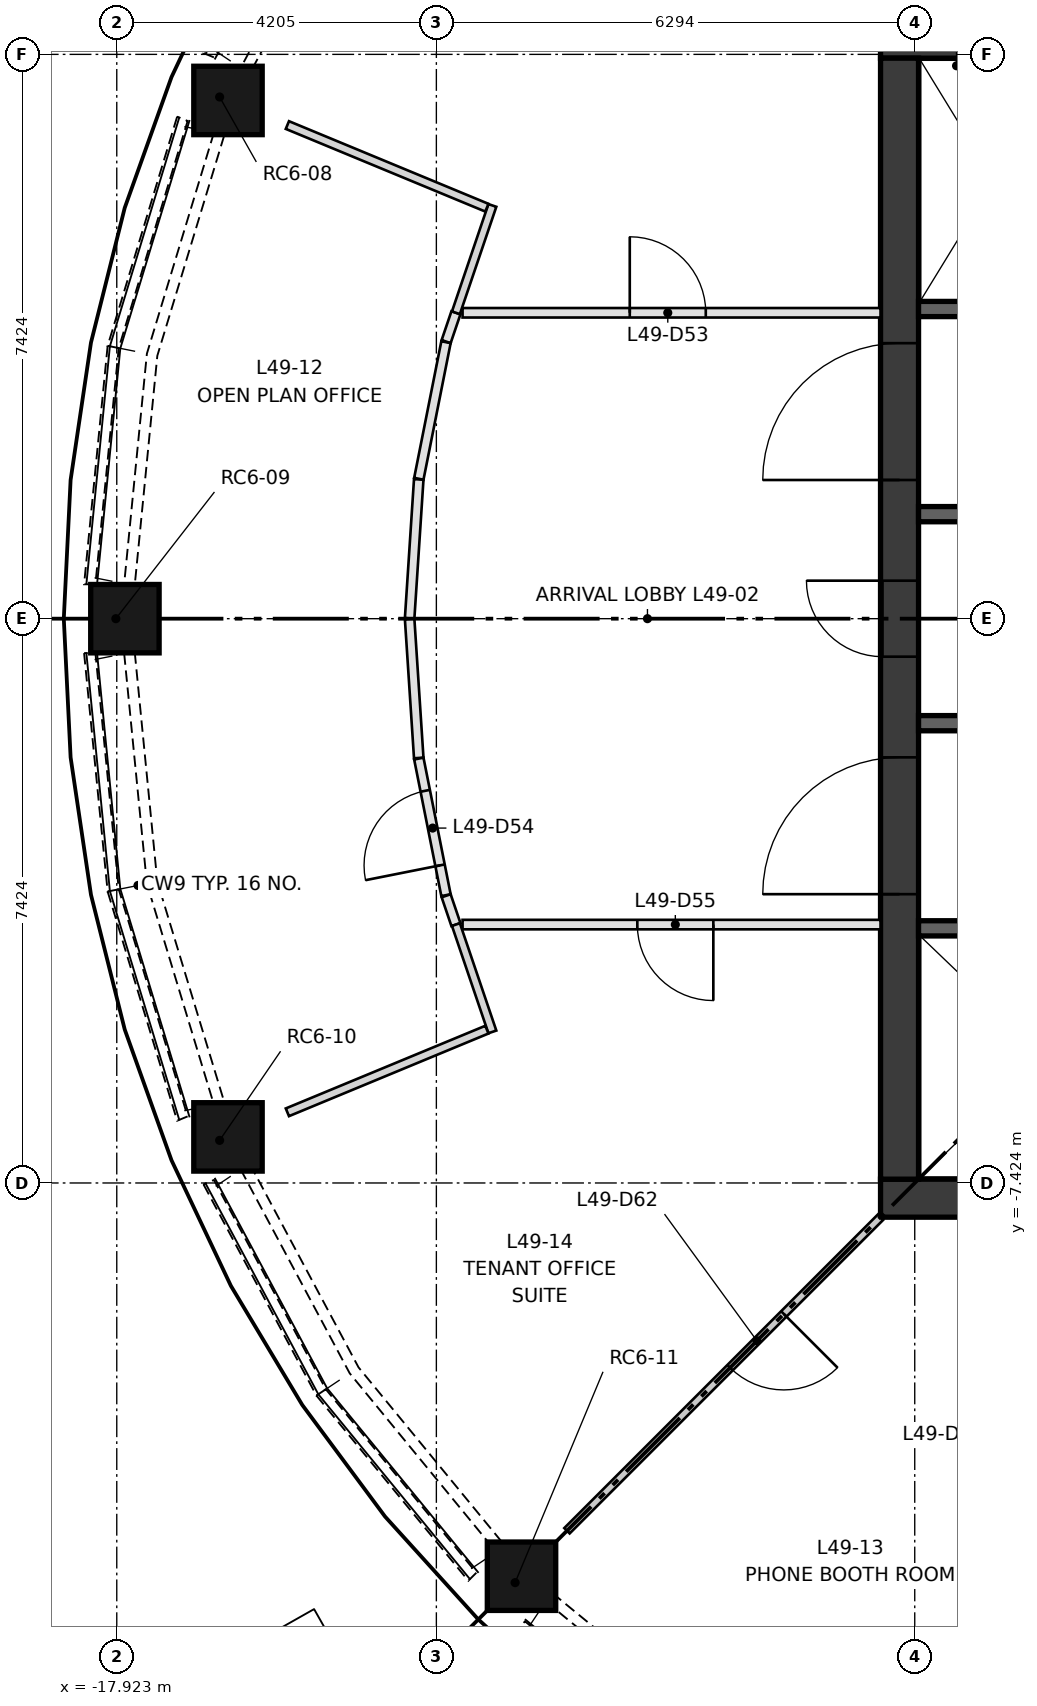
"""IFC4 building model, lengths in metres.
Left out: names, types, materials, properties, quantities, classifications, styles, units other than length and angle.
Written with IfcOpenShell. Run it as: python <this file> out.ifc"""

import sys

from ifc_helpers import new_model, si_unit, direction, frame, frame_2d, origin, origin_2d, place, context, subcontext, project, spatial, polyline, rectangle, outline, extrude, element, fill, save


model = new_model("IFC4")
c1 = context("Model", 3, precision=1e-05, world=origin(), true_north=direction((0.0, 1.0)))
c2 = subcontext(c1, "Body", "Model", "MODEL_VIEW")
j1 = project(units=[si_unit("LENGTHUNIT", "METRE"), si_unit("PLANEANGLEUNIT", "RADIAN")], contexts=[c1])
p1 = place(None, origin())
s1 = spatial("IfcSite", under=j1, at=p1, CompositionType="ELEMENT")
p2 = place(p1, origin())
s2 = spatial("IfcBuilding", under=s1, at=p2, CompositionType="ELEMENT")
p3 = place(p2, frame((0.0, 0.0, 184.3)))
s3 = spatial("IfcBuildingStorey", under=s2, at=p3, CompositionType="ELEMENT", Elevation=184.3)
p4 = place(p3, frame((-16.57, 6.863, 0.5), z_axis=(0.0, 0.0, 1.0), x_axis=(0.382100188932, 0.924120904221, 0.0)))
e1 = element("IfcColumn", 1, at=p4, inside=s3, PredefinedType="COLUMN", context=c2, shape_type="SweptSolid", body=[
    extrude(rectangle(XDim=0.9, YDim=0.9, at=origin_2d()), origin(), (0.0, -0.168, 0.986), 2.384),
])
p5 = place(p3, frame((-17.935, 0.0, 0.5), z_axis=(0.0, 0.0, 1.0), x_axis=(0.0, 1.0, 0.0)))
e2 = element("IfcColumn", 2, at=p5, inside=s3, PredefinedType="COLUMN", context=c2, shape_type="SweptSolid", body=[
    extrude(rectangle(XDim=0.9, YDim=0.9, at=origin_2d()), origin(), (0.0, -0.168, 0.986), 2.384),
])
p6 = place(p3, frame((-16.57, -6.863, 0.5), z_axis=(0.0, 0.0, 1.0), x_axis=(-0.382100188932, 0.924120904221, 0.0)))
e3 = element("IfcColumn", 3, at=p6, inside=s3, PredefinedType="COLUMN", context=c2, shape_type="SweptSolid", body=[
    extrude(rectangle(XDim=0.9, YDim=0.9, at=origin_2d()), origin(), (0.0, -0.168, 0.986), 2.384),
])
p7 = place(p3, frame((-12.682, -12.682, 0.5), z_axis=(0.0, 0.0, 1.0), x_axis=(-0.707106781187, 0.707106781187, 0.0)))
e4 = element("IfcColumn", 4, at=p7, inside=s3, PredefinedType="COLUMN", context=c2, shape_type="SweptSolid", body=[
    extrude(rectangle(XDim=0.9, YDim=0.9, at=origin_2d()), origin(), (0.0, -0.168, 0.986), 2.384),
])
for number, where, z_axis, x_axis in (
    (5, (-7.874, -7.624, 0.0), (0.0, 0.0, 1.0), (1.0, 0.0, 0.0)),
    (6, (-7.874, 7.624, 0.0), (0.0, 0.0, 1.0), (1.0, 0.0, 0.0)),
):
    element("IfcWall", number, at=place(p3, frame(where, z_axis=z_axis, x_axis=x_axis)), inside=s3, PredefinedType="SHEAR", context=c2, shape_type="SweptSolid", body=[
        extrude(rectangle(XDim=15.748, YDim=0.5, at=frame_2d((7.874, 0.0))), origin(), (0.0, 0.0, 1.0), 3.35),
    ])
p8 = place(p3, frame((-7.624, -7.374, 0.0), z_axis=(0.0, 0.0, 1.0), x_axis=(0.0, 1.0, 0.0)))
e7 = element("IfcWall", 7, at=p8, inside=s3, PredefinedType="SHEAR", context=c2, shape_type="SweptSolid", body=[
    extrude(rectangle(XDim=14.748, YDim=0.5, at=frame_2d((7.374, 0.0))), origin(), (0.0, 0.0, 1.0), 3.35),
])
p9 = place(p8, frame((6.874, 0.0, 0.0)))
e8 = element("IfcOpeningElement", 8, at=p9, cuts=e7, PredefinedType="OPENING", context=c2, shape_type="SweptSolid", body=[
    extrude(rectangle(XDim=1.0, YDim=2.1, at=frame_2d((0.5, 1.05))), frame((0.0, 0.26, 0.0), z_axis=(0.0, -1.0, 0.0), x_axis=(1.0, 0.0, 0.0)), (0.0, 0.0, 1.0), 0.52),
])
p10 = place(p8, frame((3.75, 0.0, 0.0)))
e9 = element("IfcOpeningElement", 9, at=p10, cuts=e7, PredefinedType="OPENING", context=c2, shape_type="SweptSolid", body=[
    extrude(rectangle(XDim=1.8, YDim=2.1, at=frame_2d((0.9, 1.05))), frame((0.0, 0.26, 0.0), z_axis=(0.0, -1.0, 0.0), x_axis=(1.0, 0.0, 0.0)), (0.0, 0.0, 1.0), 0.52),
])
p11 = place(p8, frame((9.198, 0.0, 0.0)))
e10 = element("IfcOpeningElement", 10, at=p11, cuts=e7, PredefinedType="OPENING", context=c2, shape_type="SweptSolid", body=[
    extrude(rectangle(XDim=1.8, YDim=2.1, at=frame_2d((0.9, 1.05))), frame((0.0, 0.26, 0.0), z_axis=(0.0, -1.0, 0.0), x_axis=(1.0, 0.0, 0.0)), (0.0, 0.0, 1.0), 0.52),
])
p12 = place(p3, frame((-7.374, -4.074, 0.0), z_axis=(0.0, 0.0, 1.0), x_axis=(1.0, 0.0, 0.0)))
e11 = element("IfcWall", 11, at=p12, inside=s3, PredefinedType="SHEAR", context=c2, shape_type="SweptSolid", body=[
    extrude(rectangle(XDim=14.748, YDim=0.2, at=frame_2d((7.374, 0.0))), origin(), (0.0, 0.0, 1.0), 3.0),
])
p13 = place(p12, frame((1.319, 0.0, 0.0)))
e12 = element("IfcOpeningElement", 12, at=p13, cuts=e11, PredefinedType="OPENING", context=c2, shape_type="SweptSolid", body=[
    extrude(rectangle(XDim=1.1, YDim=2.1, at=frame_2d((0.55, 1.05))), frame((0.0, 0.11, 0.0), z_axis=(0.0, -1.0, 0.0), x_axis=(1.0, 0.0, 0.0)), (0.0, 0.0, 1.0), 0.22),
])
p14 = place(p12, frame((4.456, 0.0, 0.0)))
e13 = element("IfcOpeningElement", 13, at=p14, cuts=e11, PredefinedType="OPENING", context=c2, shape_type="SweptSolid", body=[
    extrude(rectangle(XDim=1.1, YDim=2.1, at=frame_2d((0.55, 1.05))), frame((0.0, 0.11, 0.0), z_axis=(0.0, -1.0, 0.0), x_axis=(1.0, 0.0, 0.0)), (0.0, 0.0, 1.0), 0.22),
])
p15 = place(p12, frame((7.386, 0.0, 0.0)))
e14 = element("IfcOpeningElement", 14, at=p15, cuts=e11, PredefinedType="OPENING", context=c2, shape_type="SweptSolid", body=[
    extrude(rectangle(XDim=1.0, YDim=2.1, at=frame_2d((0.5, 1.05))), frame((0.0, 0.11, 0.0), z_axis=(0.0, -1.0, 0.0), x_axis=(1.0, 0.0, 0.0)), (0.0, 0.0, 1.0), 0.22),
])
p16 = place(p12, frame((10.009, 0.0, 0.0)))
e15 = element("IfcOpeningElement", 15, at=p16, cuts=e11, PredefinedType="OPENING", context=c2, shape_type="SweptSolid", body=[
    extrude(rectangle(XDim=1.0, YDim=2.1, at=frame_2d((0.5, 1.05))), frame((0.0, 0.11, 0.0), z_axis=(0.0, -1.0, 0.0), x_axis=(1.0, 0.0, 0.0)), (0.0, 0.0, 1.0), 0.22),
])
p17 = place(p12, frame((12.934, 0.0, 0.0)))
e16 = element("IfcOpeningElement", 16, at=p17, cuts=e11, PredefinedType="OPENING", context=c2, shape_type="SweptSolid", body=[
    extrude(rectangle(XDim=0.8, YDim=2.1, at=frame_2d((0.4, 1.05))), frame((0.0, 0.11, 0.0), z_axis=(0.0, -1.0, 0.0), x_axis=(1.0, 0.0, 0.0)), (0.0, 0.0, 1.0), 0.22),
])
p18 = place(p3, frame((-7.374, 4.074, 0.0), z_axis=(0.0, 0.0, 1.0), x_axis=(1.0, 0.0, 0.0)))
e17 = element("IfcWall", 17, at=p18, inside=s3, PredefinedType="SHEAR", context=c2, shape_type="SweptSolid", body=[
    extrude(rectangle(XDim=7.374, YDim=0.2, at=frame_2d((3.687, 0.0))), origin(), (0.0, 0.0, 1.0), 3.0),
])
p19 = place(p18, frame((0.684, 0.0, 0.0)))
e18 = element("IfcOpeningElement", 18, at=p19, cuts=e17, PredefinedType="OPENING", context=c2, shape_type="SweptSolid", body=[
    extrude(rectangle(XDim=1.0, YDim=2.1, at=frame_2d((0.5, 1.05))), frame((0.0, 0.11, 0.0), z_axis=(0.0, -1.0, 0.0), x_axis=(1.0, 0.0, 0.0)), (0.0, 0.0, 1.0), 0.22),
])
p20 = place(p18, frame((2.453, 0.0, 0.0)))
e19 = element("IfcOpeningElement", 19, at=p20, cuts=e17, PredefinedType="OPENING", context=c2, shape_type="SweptSolid", body=[
    extrude(rectangle(XDim=1.0, YDim=2.1, at=frame_2d((0.5, 1.05))), frame((0.0, 0.11, 0.0), z_axis=(0.0, -1.0, 0.0), x_axis=(1.0, 0.0, 0.0)), (0.0, 0.0, 1.0), 0.22),
])
p21 = place(p18, frame((4.221, 0.0, 0.0)))
e20 = element("IfcOpeningElement", 20, at=p21, cuts=e17, PredefinedType="OPENING", context=c2, shape_type="SweptSolid", body=[
    extrude(rectangle(XDim=1.0, YDim=2.1, at=frame_2d((0.5, 1.05))), frame((0.0, 0.11, 0.0), z_axis=(0.0, -1.0, 0.0), x_axis=(1.0, 0.0, 0.0)), (0.0, 0.0, 1.0), 0.22),
])
p22 = place(p18, frame((5.99, 0.0, 0.0)))
e21 = element("IfcOpeningElement", 21, at=p22, cuts=e17, PredefinedType="OPENING", context=c2, shape_type="SweptSolid", body=[
    extrude(rectangle(XDim=1.0, YDim=2.1, at=frame_2d((0.5, 1.05))), frame((0.0, 0.11, 0.0), z_axis=(0.0, -1.0, 0.0), x_axis=(1.0, 0.0, 0.0)), (0.0, 0.0, 1.0), 0.22),
])
for number, where, z_axis, x_axis in (
    (22, (-7.374, -1.375, 0.0), (0.0, 0.0, 1.0), (1.0, 0.0, 0.0)),
    (23, (-7.374, 1.375, 0.0), (0.0, 0.0, 1.0), (1.0, 0.0, 0.0)),
):
    element("IfcWall", number, at=place(p3, frame(where, z_axis=z_axis, x_axis=x_axis)), inside=s3, PredefinedType="SHEAR", context=c2, shape_type="SweptSolid", body=[
        extrude(rectangle(XDim=3.0, YDim=0.2, at=frame_2d((1.5, 0.0))), origin(), (0.0, 0.0, 1.0), 3.0),
    ])
p23 = place(p3, frame((-15.296, 10.221, 0.0), z_axis=(-0.870053087177, 0.465338838382, 0.162688017342), x_axis=(-0.471621015005, -0.881801348468, 6.731272e-06)))
e24 = element("IfcWall", 24, at=p23, inside=s3, PredefinedType="SOLIDWALL", context=c2, shape_type="SweptSolid", body=[
    extrude(outline(polyline([(0.0, 0.0), (3.152, -2.776e-17), (3.137, 0.912), (0.015, 0.912), (0.0, 0.0)])), origin(), (0.0, 0.0, -1.0), 0.3),
])
p24 = place(p3, frame((-17.128, 6.605, 0.0), z_axis=(-0.94416395345, 0.286447724297, 0.162794748846), x_axis=(-0.290320348038, -0.956929514391, 1.683956e-06)))
e25 = element("IfcWall", 25, at=p24, inside=s3, PredefinedType="SOLIDWALL", context=c2, shape_type="SweptSolid", body=[
    extrude(outline(polyline([(0.0, 0.0), (3.151, 0.0), (3.137, 0.912), (0.014, 0.912), (0.0, 0.0)])), origin(), (0.0, 0.0, -1.0), 0.3),
])
p25 = place(p3, frame((-18.043, 3.59, 0.0), z_axis=(-0.981910573414, 0.097001095349, 0.162611233681), x_axis=(-0.098308707783, -0.995155966643, 5.283619e-06)))
e26 = element("IfcWall", 26, at=p25, inside=s3, PredefinedType="SOLIDWALL", context=c2, shape_type="SweptSolid", body=[
    extrude(outline(polyline([(0.0, 0.0), (3.152, 0.0), (3.138, 0.912), (0.015, 0.912), (0.0, 0.0)])), origin(), (0.0, 0.0, -1.0), 0.3),
])
p26 = place(p3, frame((-18.353, -0.452, 0.0), z_axis=(-0.981893053275, -0.096960979381, 0.162740899619), x_axis=(0.098271198901, -0.995159671342, 9.28862e-07)))
e27 = element("IfcWall", 27, at=p26, inside=s3, PredefinedType="SOLIDWALL", context=c2, shape_type="SweptSolid", body=[
    extrude(outline(polyline([(0.0, 0.0), (3.152, 1.388e-17), (3.138, 0.912), (0.015, 0.912), (0.0, 0.0)])), origin(), (0.0, 0.0, -1.0), 0.3),
])
p27 = place(p3, frame((-18.043, -3.59, 0.0), z_axis=(-0.944194299341, -0.286418531815, 0.162670064008), x_axis=(0.290285654048, -0.956940039415, 4.29464e-06)))
e28 = element("IfcWall", 28, at=p27, inside=s3, PredefinedType="SOLIDWALL", context=c2, shape_type="SweptSolid", body=[
    extrude(outline(polyline([(0.0, 0.0), (3.151, 5.551e-17), (3.137, 0.912), (0.014, 0.912), (0.0, 0.0)])), origin(), (0.0, 0.0, -1.0), 0.3),
])
p28 = place(p3, frame((-16.782, -7.441, 0.0), z_axis=(-0.870053087177, -0.465338838382, 0.162688017342), x_axis=(0.471621015005, -0.881801348468, -6.731272e-06)))
e29 = element("IfcWall", 29, at=p28, inside=s3, PredefinedType="SOLIDWALL", context=c2, shape_type="SweptSolid", body=[
    extrude(outline(polyline([(0.0, 0.0), (3.152, 2.776e-17), (3.137, 0.912), (0.015, 0.912), (0.0, 0.0)])), origin(), (0.0, 0.0, -1.0), 0.3),
])
p29 = place(p3, frame((-15.296, -10.221, 0.0), z_axis=(-0.762829436571, -0.625791219471, 0.162716318582), x_axis=(0.634244680745, -0.773132385109, 6.479811e-06)))
e30 = element("IfcWall", 30, at=p29, inside=s3, PredefinedType="SOLIDWALL", context=c2, shape_type="SweptSolid", body=[
    extrude(outline(polyline([(0.0, 0.0), (3.151, 0.0), (3.137, 0.912), (0.014, 0.912), (0.0, 0.0)])), origin(), (0.0, 0.0, -1.0), 0.3),
])
p30 = place(p3, frame((-12.657, -13.297, 0.0), z_axis=(-0.625801401555, -0.762803450932, 0.162798959018), x_axis=(0.773117144297, -0.634263258583, -2.518315e-06)))
e31 = element("IfcWall", 31, at=p30, inside=s3, PredefinedType="SOLIDWALL", context=c2, shape_type="SweptSolid", body=[
    extrude(outline(polyline([(0.0, 0.0), (3.151, 5.551e-17), (3.137, 0.912), (0.015, 0.912), (0.0, 0.0)])), origin(), (0.0, 0.0, -1.0), 0.3),
])
p31 = place(p3, frame((-13.373, 4.024, 0.0), z_axis=(0.0, 0.0, 1.0), x_axis=(1.0, 0.0, 0.0)))
e32 = element("IfcWall", 32, at=p31, inside=s3, PredefinedType="PARTITIONING", context=c2, shape_type="SweptSolid", body=[
    extrude(rectangle(XDim=5.499, YDim=0.125, at=frame_2d((2.75, 0.0))), origin(), (0.0, 0.0, 1.0), 3.0),
])
p32 = place(p31, frame((2.2, 0.0, 0.0)))
e33 = element("IfcOpeningElement", 33, at=p32, cuts=e32, PredefinedType="OPENING", context=c2, shape_type="SweptSolid", body=[
    extrude(rectangle(XDim=1.0, YDim=2.1, at=frame_2d((0.5, 1.05))), frame((0.0, 0.073, 0.0), z_axis=(0.0, -1.0, 0.0), x_axis=(1.0, 0.0, 0.0)), (0.0, 0.0, 1.0), 0.145),
])
for number, where, z_axis, x_axis in (
    (34, (-14.07, 0.004, 0.0), (0.0, 0.0, 1.0), (0.065, 0.998, 0.0)),
    (35, (-13.95, -1.833, 0.0), (0.0, 0.0, 1.0), (-0.065, 0.998, 0.0)),
    (36, (-13.949, 1.841, 0.0), (0.0, 0.0, 1.0), (0.195, 0.981, 0.0)),
):
    element("IfcWall", number, at=place(p3, frame(where, z_axis=z_axis, x_axis=x_axis)), inside=s3, PredefinedType="PARTITIONING", context=c2, shape_type="SweptSolid", body=[
        extrude(rectangle(XDim=1.832, YDim=0.125, at=frame_2d((0.916, 0.0))), origin(), (0.0, 0.0, 1.0), 3.0),
    ])
p33 = place(p3, frame((-13.591, -3.638, 0.0), z_axis=(0.0, 0.0, 1.0), x_axis=(-0.195065465094, 0.980790224425, 0.0)))
e37 = element("IfcWall", 37, at=p33, inside=s3, PredefinedType="PARTITIONING", context=c2, shape_type="SweptSolid", body=[
    extrude(rectangle(XDim=1.832, YDim=0.125, at=frame_2d((0.916, 0.0))), origin(), (0.0, 0.0, 1.0), 3.0),
])
p34 = place(p33, frame((0.4, 0.0, 0.0)))
e38 = element("IfcOpeningElement", 38, at=p34, cuts=e37, PredefinedType="OPENING", context=c2, shape_type="SweptSolid", body=[
    extrude(rectangle(XDim=1.0, YDim=2.1, at=frame_2d((0.5, 1.05))), frame((0.0, 0.073, 0.0), z_axis=(0.0, -1.0, 0.0), x_axis=(1.0, 0.0, 0.0)), (0.0, 0.0, 1.0), 0.145),
])
for number, where, z_axis, x_axis in (
    (39, (-13.589, 3.646, 0.0), (0.0, 0.0, 1.0), (0.322, 0.947, 0.0)),
    (40, (-13.461, -4.024, 0.0), (0.0, 0.0, 1.0), (-0.322, 0.947, 0.0)),
):
    element("IfcWall", number, at=place(p3, frame(where, z_axis=z_axis, x_axis=x_axis)), inside=s3, PredefinedType="PARTITIONING", context=c2, shape_type="SweptSolid", body=[
        extrude(rectangle(XDim=0.4, YDim=0.125, at=frame_2d((0.2, 0.0))), origin(), (0.0, 0.0, 1.0), 3.0),
    ])
p35 = place(p3, frame((-7.874, -4.024, 0.0), z_axis=(0.0, 0.0, 1.0), x_axis=(-1.0, 0.0, 0.0)))
e41 = element("IfcWall", 41, at=p35, inside=s3, PredefinedType="PARTITIONING", context=c2, shape_type="SweptSolid", body=[
    extrude(rectangle(XDim=5.499, YDim=0.125, at=frame_2d((2.75, 0.0))), origin(), (0.0, 0.0, 1.0), 3.0),
])
p36 = place(p35, frame((2.2, 0.0, 0.0)))
e42 = element("IfcOpeningElement", 42, at=p36, cuts=e41, PredefinedType="OPENING", context=c2, shape_type="SweptSolid", body=[
    extrude(rectangle(XDim=1.0, YDim=2.1, at=frame_2d((0.5, 1.05))), frame((0.0, 0.073, 0.0), z_axis=(0.0, -1.0, 0.0), x_axis=(1.0, 0.0, 0.0)), (0.0, 0.0, 1.0), 0.145),
])
p37 = place(p3, frame((-13.461, 4.024, 0.0), z_axis=(0.0, 0.0, 1.0), x_axis=(0.321527037068, 0.946900398371, 0.0)))
e43 = element("IfcWall", 43, at=p37, inside=s3, PredefinedType="PARTITIONING", context=c2, shape_type="SweptSolid", body=[
    extrude(rectangle(XDim=1.491, YDim=0.11, at=frame_2d((0.746, 0.0))), origin(), (0.0, 0.0, 1.0), 3.0),
])
p38 = place(p3, frame((-13.053, 5.407, 0.0), z_axis=(0.0, 0.0, 1.0), x_axis=(-0.923898495358, 0.382637648794, 0.0)))
e44 = element("IfcWall", 44, at=p38, inside=s3, PredefinedType="PARTITIONING", context=c2, shape_type="SweptSolid", body=[
    extrude(rectangle(XDim=2.841, YDim=0.11, at=frame_2d((1.421, 0.0))), origin(), (0.0, 0.0, 1.0), 3.0),
])
p39 = place(p3, frame((-13.461, -4.024, 0.0), z_axis=(0.0, 0.0, 1.0), x_axis=(0.321527037068, -0.946900398371, 0.0)))
e45 = element("IfcWall", 45, at=p39, inside=s3, PredefinedType="PARTITIONING", context=c2, shape_type="SweptSolid", body=[
    extrude(rectangle(XDim=1.491, YDim=0.11, at=frame_2d((0.746, 0.0))), origin(), (0.0, 0.0, 1.0), 3.0),
])
p40 = place(p3, frame((-13.053, -5.407, 0.0), z_axis=(0.0, 0.0, 1.0), x_axis=(-0.923898495358, -0.382637648794, 0.0)))
e46 = element("IfcWall", 46, at=p40, inside=s3, PredefinedType="PARTITIONING", context=c2, shape_type="SweptSolid", body=[
    extrude(rectangle(XDim=2.841, YDim=0.11, at=frame_2d((1.421, 0.0))), origin(), (0.0, 0.0, 1.0), 3.0),
])
p41 = place(p3, frame((-7.874, -7.874, 0.0), z_axis=(0.0, 0.0, 1.0), x_axis=(-0.707106781187, -0.707106781187, 0.0)))
e47 = element("IfcWall", 47, at=p41, inside=s3, PredefinedType="PARTITIONING", context=c2, shape_type="SweptSolid", body=[
    extrude(rectangle(XDim=5.834, YDim=0.1, at=frame_2d((2.917, 0.0))), origin(), (0.0, 0.0, 1.0), 3.0),
])
p42 = place(p41, frame((1.8, 0.0, 0.0)))
e48 = element("IfcOpeningElement", 48, at=p42, cuts=e47, PredefinedType="OPENING", context=c2, shape_type="SweptSolid", body=[
    extrude(rectangle(XDim=1.0, YDim=2.1, at=frame_2d((0.5, 1.05))), frame((0.0, 0.06, 0.0), z_axis=(0.0, -1.0, 0.0), x_axis=(1.0, 0.0, 0.0)), (0.0, 0.0, 1.0), 0.12),
])
p43 = place(p9, origin())
e49 = element("IfcDoor", 49, at=p43, inside=s3, OperationType="SINGLE_SWING_RIGHT", PredefinedType="DOOR", context=c2, shape_type="SweptSolid", body=[
    extrude(rectangle(XDim=1.0, YDim=2.1, at=frame_2d((0.5, 1.05))), frame((0.0, 0.25, 0.0), z_axis=(0.0, -1.0, 0.0), x_axis=(1.0, 0.0, 0.0)), (0.0, 0.0, 1.0), 0.05),
])
fill(e8, e49)
p44 = place(p10, origin())
e50 = element("IfcDoor", 50, at=p44, inside=s3, OperationType="DOUBLE_DOOR_SINGLE_SWING", PredefinedType="DOOR", context=c2, shape_type="SweptSolid", body=[
    extrude(rectangle(XDim=1.8, YDim=2.1, at=frame_2d((0.9, 1.05))), frame((0.0, 0.025, 0.0), z_axis=(0.0, -1.0, 0.0), x_axis=(1.0, 0.0, 0.0)), (0.0, 0.0, 1.0), 0.05),
])
fill(e9, e50)
p45 = place(p11, origin())
e51 = element("IfcDoor", 51, at=p45, inside=s3, OperationType="DOUBLE_DOOR_SINGLE_SWING", PredefinedType="DOOR", context=c2, shape_type="SweptSolid", body=[
    extrude(rectangle(XDim=1.8, YDim=2.1, at=frame_2d((0.9, 1.05))), frame((0.0, 0.025, 0.0), z_axis=(0.0, -1.0, 0.0), x_axis=(1.0, 0.0, 0.0)), (0.0, 0.0, 1.0), 0.05),
])
fill(e10, e51)
p46 = place(p32, origin())
e52 = element("IfcDoor", 52, at=p46, inside=s3, OperationType="SINGLE_SWING_LEFT", PredefinedType="DOOR", context=c2, shape_type="SweptSolid", body=[
    extrude(rectangle(XDim=1.0, YDim=2.1, at=frame_2d((0.5, 1.05))), frame((0.0, 0.025, 0.0), z_axis=(0.0, -1.0, 0.0), x_axis=(1.0, 0.0, 0.0)), (0.0, 0.0, 1.0), 0.05),
])
fill(e33, e52)
p47 = place(p34, origin())
e53 = element("IfcDoor", 53, at=p47, inside=s3, OperationType="SINGLE_SWING_LEFT", PredefinedType="DOOR", context=c2, shape_type="SweptSolid", body=[
    extrude(rectangle(XDim=1.0, YDim=2.1, at=frame_2d((0.5, 1.05))), frame((0.0, 0.025, 0.0), z_axis=(0.0, -1.0, 0.0), x_axis=(1.0, 0.0, 0.0)), (0.0, 0.0, 1.0), 0.05),
])
fill(e38, e53)
p48 = place(p36, origin())
e54 = element("IfcDoor", 54, at=p48, inside=s3, OperationType="SINGLE_SWING_LEFT", PredefinedType="DOOR", context=c2, shape_type="SweptSolid", body=[
    extrude(rectangle(XDim=1.0, YDim=2.1, at=frame_2d((0.5, 1.05))), frame((0.0, 0.025, 0.0), z_axis=(0.0, -1.0, 0.0), x_axis=(1.0, 0.0, 0.0)), (0.0, 0.0, 1.0), 0.05),
])
fill(e42, e54)
p49 = place(p42, origin())
e55 = element("IfcDoor", 55, at=p49, inside=s3, OperationType="SINGLE_SWING_LEFT", PredefinedType="DOOR", context=c2, shape_type="SweptSolid", body=[
    extrude(rectangle(XDim=1.0, YDim=2.1, at=frame_2d((0.5, 1.05))), frame((0.0, 0.025, 0.0), z_axis=(0.0, -1.0, 0.0), x_axis=(1.0, 0.0, 0.0)), (0.0, 0.0, 1.0), 0.05),
])
fill(e48, e55)
save(model, sys.argv[1])
